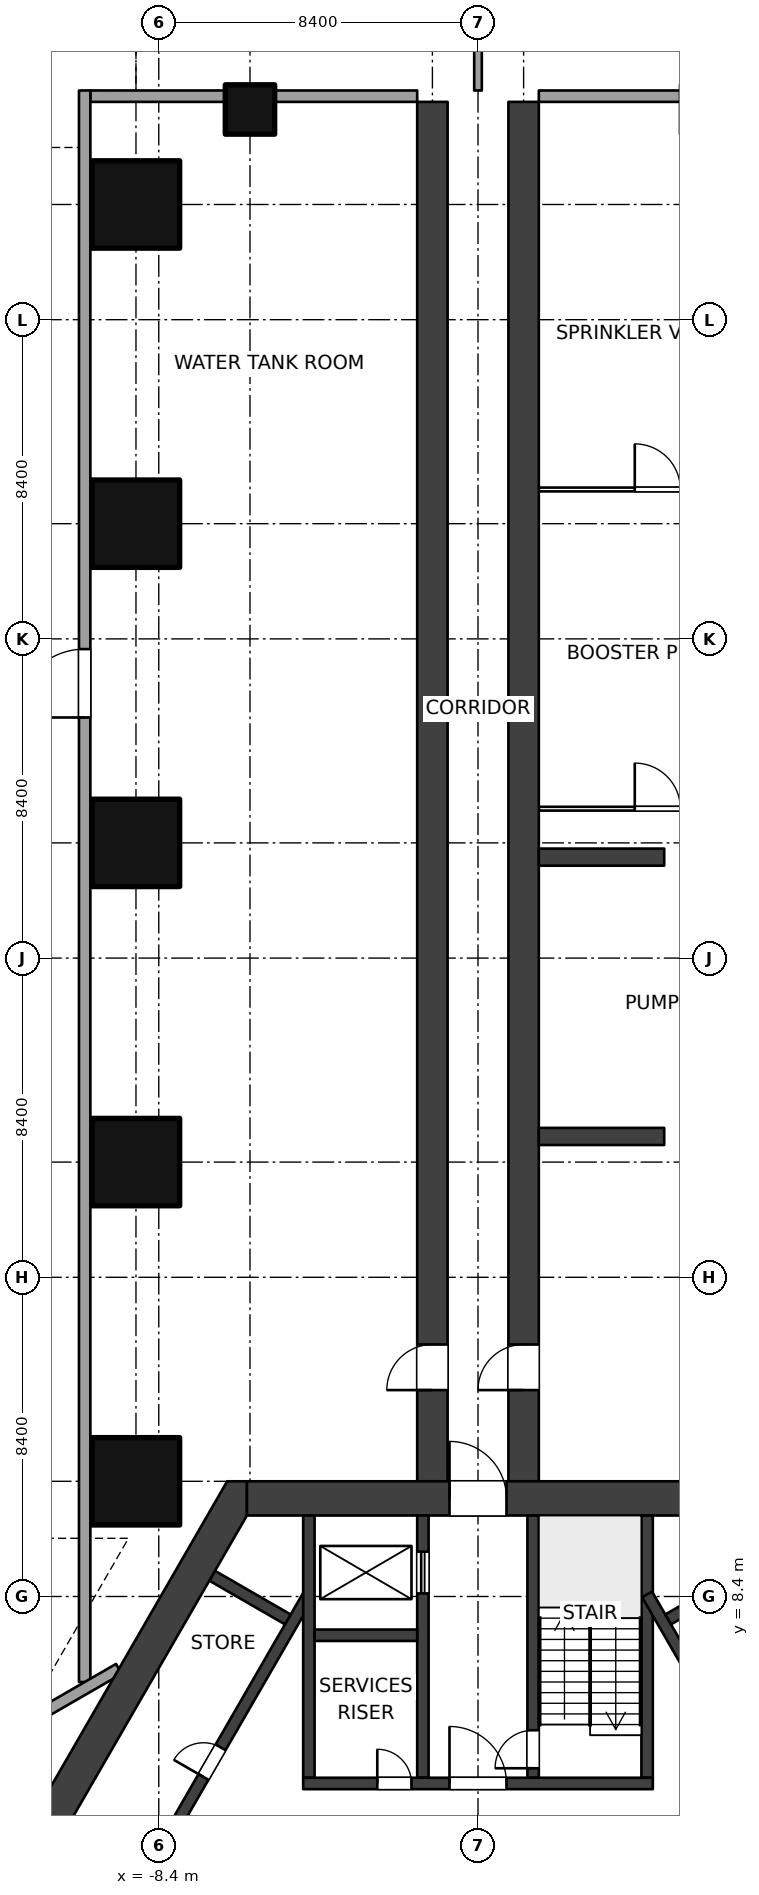
"""IFC4 building model, lengths in metres.
Left out: names, types, materials, properties, quantities, classifications, styles, units other than length and angle.
Written with IfcOpenShell. Run it as: python <this file> out.ifc"""

import sys

from ifc_helpers import new_model, si_unit, direction, frame, frame_2d, origin, origin_2d, place, context, subcontext, project, spatial, polyline, rectangle, outline, extrude, element, fill, save


model = new_model("IFC4")
c1 = context("Model", 3, precision=1e-05, world=origin(), true_north=direction((0.0, 1.0)))
c2 = subcontext(c1, "Body", "Model", "MODEL_VIEW")
j1 = project(units=[si_unit("LENGTHUNIT", "METRE"), si_unit("PLANEANGLEUNIT", "RADIAN")], contexts=[c1])
p1 = place(None, origin())
s1 = spatial("IfcSite", under=j1, at=p1, CompositionType="ELEMENT")
p2 = place(p1, origin())
s2 = spatial("IfcBuilding", under=s1, at=p2, CompositionType="ELEMENT")
p3 = place(p2, frame((0.0, 0.0, -10.5)))
s3 = spatial("IfcBuildingStorey", under=s2, at=p3, CompositionType="ELEMENT", Elevation=-10.5)
for number, where, z_axis, x_axis in (
    (1, (-9.0, 11.432, 0.0), (0.0, 0.0, 1.0), (1.0, 0.0, 0.0)),
    (2, (-9.0, 19.832, 0.0), (0.0, 0.0, 1.0), (1.0, 0.0, 0.0)),
    (3, (-9.0, 28.231, 0.0), (0.0, 0.0, 1.0), (1.0, 0.0, 0.0)),
    (4, (-9.0, 36.632, 0.0), (0.0, 0.0, 1.0), (1.0, 0.0, 0.0)),
    (5, (-9.0, 45.031, 0.0), (0.0, 0.0, 1.0), (1.0, 0.0, 0.0)),
):
    element("IfcColumn", number, at=place(p3, frame(where, z_axis=z_axis, x_axis=x_axis)), inside=s3, PredefinedType="COLUMN", context=c2, shape_type="SweptSolid", body=[
        extrude(rectangle(XDim=2.3, YDim=2.3, at=origin_2d()), origin(), (0.0, 0.0, 1.0), 3.5),
    ])
p4 = place(p3, frame((-6.0, 47.531, 0.0), z_axis=(0.0, 0.0, 1.0), x_axis=(1.0, 0.0, 0.0)))
e6 = element("IfcColumn", 6, at=p4, inside=s3, PredefinedType="COLUMN", context=c2, shape_type="SweptSolid", body=[
    extrude(rectangle(XDim=1.3, YDim=1.3, at=origin_2d()), origin(), (0.0, 0.0, 1.0), 3.5),
])
p5 = place(p3, frame((-6.08, 10.981, 0.0), z_axis=(0.0, 0.0, 1.0), x_axis=(1.0, 0.0, 0.0)))
e7 = element("IfcWall", 7, at=p5, inside=s3, PredefinedType="SHEAR", context=c2, shape_type="SweptSolid", body=[
    extrude(rectangle(XDim=12.161, YDim=0.9, at=frame_2d((6.08, 0.0))), origin(), (0.0, 0.0, 1.0), 3.5),
])
p6 = place(p5, frame((5.33, 0.0, 0.0)))
e8 = element("IfcOpeningElement", 8, at=p6, cuts=e7, PredefinedType="OPENING", context=c2, shape_type="SweptSolid", body=[
    extrude(rectangle(XDim=1.5, YDim=2.1, at=frame_2d((0.75, 1.05))), frame((0.0, 0.46, 0.0), z_axis=(0.0, -1.0, 0.0), x_axis=(1.0, 0.0, 0.0)), (0.0, 0.0, 1.0), 0.92),
])
p7 = place(p3, origin())
e9 = element("IfcWall", 9, at=p7, inside=s3, PredefinedType="SHEAR", context=c2, shape_type="SweptSolid", body=[
    extrude(outline(polyline([(-6.6, 11.432), (-13.2, 0.0), (-12.94, -0.45), (-12.161, 0.0), (-6.08, 10.531), (-6.08, 11.432), (-6.6, 11.432)])), origin(), (0.0, 0.0, 1.0), 3.5),
])
p8 = place(p3, frame((-4.6, 3.48, 0.0), z_axis=(0.0, 0.0, 1.0), x_axis=(1.0, 0.0, 0.0)))
e10 = element("IfcWall", 10, at=p8, inside=s3, PredefinedType="SHEAR", context=c2, shape_type="SweptSolid", body=[
    extrude(rectangle(XDim=9.2, YDim=0.3, at=frame_2d((4.6, 0.0))), origin(), (0.0, 0.0, 1.0), 3.5),
])
p9 = place(p8, frame((3.85, 0.0, 0.0)))
e11 = element("IfcOpeningElement", 11, at=p9, cuts=e10, PredefinedType="OPENING", context=c2, shape_type="SweptSolid", body=[
    extrude(rectangle(XDim=1.5, YDim=2.1, at=frame_2d((0.75, 1.05))), frame((0.0, 0.16, 0.0), z_axis=(0.0, -1.0, 0.0), x_axis=(1.0, 0.0, 0.0)), (0.0, 0.0, 1.0), 0.32),
])
p10 = place(p8, frame((1.95, 0.0, 0.0)))
e12 = element("IfcOpeningElement", 12, at=p10, cuts=e10, PredefinedType="OPENING", context=c2, shape_type="SweptSolid", body=[
    extrude(rectangle(XDim=0.9, YDim=2.1, at=frame_2d((0.45, 1.05))), frame((0.0, 0.16, 0.0), z_axis=(0.0, -1.0, 0.0), x_axis=(1.0, 0.0, 0.0)), (0.0, 0.0, 1.0), 0.32),
])
p11 = place(p3, frame((1.45, 3.63, 0.0), z_axis=(0.0, 0.0, 1.0), x_axis=(0.0, 1.0, 0.0)))
e13 = element("IfcWall", 13, at=p11, inside=s3, PredefinedType="SHEAR", context=c2, shape_type="SweptSolid", body=[
    extrude(rectangle(XDim=6.902, YDim=0.3, at=frame_2d((3.451, 0.0))), origin(), (0.0, 0.0, 1.0), 3.5),
])
p12 = place(p11, frame((0.25, 0.0, 0.0)))
e14 = element("IfcOpeningElement", 14, at=p12, cuts=e13, PredefinedType="OPENING", context=c2, shape_type="SweptSolid", body=[
    extrude(rectangle(XDim=1.0, YDim=2.1, at=frame_2d((0.5, 1.05))), frame((0.0, 0.16, 0.0), z_axis=(0.0, -1.0, 0.0), x_axis=(1.0, 0.0, 0.0)), (0.0, 0.0, 1.0), 0.32),
])
p13 = place(p3, frame((4.45, 3.63, 0.0), z_axis=(0.0, 0.0, 1.0), x_axis=(0.0, 1.0, 0.0)))
e15 = element("IfcWall", 15, at=p13, inside=s3, PredefinedType="SHEAR", context=c2, shape_type="SweptSolid", body=[
    extrude(rectangle(XDim=6.902, YDim=0.3, at=frame_2d((3.451, 0.0))), origin(), (0.0, 0.0, 1.0), 3.5),
])
p14 = place(p3, frame((-1.45, 3.63, 0.0), z_axis=(0.0, 0.0, 1.0), x_axis=(0.0, 1.0, 0.0)))
e16 = element("IfcWall", 16, at=p14, inside=s3, PredefinedType="SHEAR", context=c2, shape_type="SweptSolid", body=[
    extrude(rectangle(XDim=6.902, YDim=0.3, at=frame_2d((3.451, 0.0))), origin(), (0.0, 0.0, 1.0), 3.5),
])
p15 = place(p14, frame((4.85, 0.0, 0.0)))
e17 = element("IfcOpeningElement", 17, at=p15, cuts=e16, PredefinedType="OPENING", context=c2, shape_type="SweptSolid", body=[
    extrude(rectangle(XDim=1.1, YDim=2.1, at=frame_2d((0.55, 1.05))), frame((0.0, 0.16, 0.0), z_axis=(0.0, -1.0, 0.0), x_axis=(1.0, 0.0, 0.0)), (0.0, 0.0, 1.0), 0.32),
])
p16 = place(p3, frame((-4.45, 3.63, 0.0), z_axis=(0.0, 0.0, 1.0), x_axis=(0.0, 1.0, 0.0)))
e18 = element("IfcWall", 18, at=p16, inside=s3, PredefinedType="SHEAR", context=c2, shape_type="SweptSolid", body=[
    extrude(rectangle(XDim=6.902, YDim=0.3, at=frame_2d((3.451, 0.0))), origin(), (0.0, 0.0, 1.0), 3.5),
])
p17 = place(p3, frame((-4.3, 7.38, 0.0), z_axis=(0.0, 0.0, 1.0), x_axis=(1.0, 0.0, 0.0)))
e19 = element("IfcWall", 19, at=p17, inside=s3, PredefinedType="SHEAR", context=c2, shape_type="SweptSolid", body=[
    extrude(rectangle(XDim=2.7, YDim=0.3, at=frame_2d((1.35, 0.0))), origin(), (0.0, 0.0, 1.0), 3.5),
])
p18 = place(p3, frame((4.45, 8.455, 0.0), z_axis=(0.0, 0.0, 1.0), x_axis=(0.500002290144, -0.866024081565, 0.0)))
e20 = element("IfcWall", 20, at=p18, inside=s3, PredefinedType="SHEAR", context=c2, shape_type="SweptSolid", body=[
    extrude(rectangle(XDim=10.195, YDim=0.3, at=frame_2d((5.098, 0.0))), origin(), (0.0, 0.0, 1.0), 3.5),
])
p19 = place(p18, frame((4.648, 0.0, 0.0)))
e21 = element("IfcOpeningElement", 21, at=p19, cuts=e20, PredefinedType="OPENING", context=c2, shape_type="SweptSolid", body=[
    extrude(rectangle(XDim=0.9, YDim=2.1, at=frame_2d((0.45, 1.05))), frame((0.0, 0.16, 0.0), z_axis=(0.0, -1.0, 0.0), x_axis=(1.0, 0.0, 0.0)), (0.0, 0.0, 1.0), 0.32),
])
p20 = place(p3, frame((5.004, 7.796, 0.0), z_axis=(0.0, 0.0, 1.0), x_axis=(0.866053019151, 0.499952165731, 0.0)))
e22 = element("IfcWall", 22, at=p20, inside=s3, PredefinedType="SHEAR", context=c2, shape_type="SweptSolid", body=[
    extrude(rectangle(XDim=2.3, YDim=0.3, at=frame_2d((1.15, 0.0))), origin(), (0.0, 0.0, 1.0), 3.5),
])
p21 = place(p3, frame((-9.548, -0.374, 0.0), z_axis=(0.0, 0.0, 1.0), x_axis=(0.500002290144, 0.866024081565, 0.0)))
e23 = element("IfcWall", 23, at=p21, inside=s3, PredefinedType="SHEAR", context=c2, shape_type="SweptSolid", body=[
    extrude(rectangle(XDim=10.195, YDim=0.3, at=frame_2d((5.098, 0.0))), origin(), (0.0, 0.0, 1.0), 3.5),
])
p22 = place(p21, frame((4.648, 0.0, 0.0)))
e24 = element("IfcOpeningElement", 24, at=p22, cuts=e23, PredefinedType="OPENING", context=c2, shape_type="SweptSolid", body=[
    extrude(rectangle(XDim=0.9, YDim=2.1, at=frame_2d((0.45, 1.05))), frame((0.0, 0.16, 0.0), z_axis=(0.0, -1.0, 0.0), x_axis=(1.0, 0.0, 0.0)), (0.0, 0.0, 1.0), 0.32),
])
p23 = place(p3, frame((-5.004, 7.796, 0.0), z_axis=(0.0, 0.0, 1.0), x_axis=(-0.866053019151, 0.499952165731, 0.0)))
e25 = element("IfcWall", 25, at=p23, inside=s3, PredefinedType="SHEAR", context=c2, shape_type="SweptSolid", body=[
    extrude(rectangle(XDim=2.3, YDim=0.3, at=frame_2d((1.15, 0.0))), origin(), (0.0, 0.0, 1.0), 3.5),
])
p24 = place(p3, frame((-1.2, 10.981, 0.0), z_axis=(0.0, 0.0, 1.0), x_axis=(0.0, 1.0, 0.0)))
e26 = element("IfcWall", 26, at=p24, inside=s3, PredefinedType="SHEAR", context=c2, shape_type="SweptSolid", body=[
    extrude(rectangle(XDim=36.75, YDim=0.8, at=frame_2d((18.375, 0.0))), origin(), (0.0, 0.0, 1.0), 3.5),
])
p25 = place(p24, frame((2.85, 0.0, 0.0)))
e27 = element("IfcOpeningElement", 27, at=p25, cuts=e26, PredefinedType="OPENING", context=c2, shape_type="SweptSolid", body=[
    extrude(rectangle(XDim=1.2, YDim=2.1, at=frame_2d((0.6, 1.05))), frame((0.0, 0.41, 0.0), z_axis=(0.0, -1.0, 0.0), x_axis=(1.0, 0.0, 0.0)), (0.0, 0.0, 1.0), 0.82),
])
p26 = place(p3, frame((1.2, 10.981, 0.0), z_axis=(0.0, 0.0, 1.0), x_axis=(0.0, 1.0, 0.0)))
e28 = element("IfcWall", 28, at=p26, inside=s3, PredefinedType="SHEAR", context=c2, shape_type="SweptSolid", body=[
    extrude(rectangle(XDim=36.75, YDim=0.8, at=frame_2d((18.375, 0.0))), origin(), (0.0, 0.0, 1.0), 3.5),
])
p27 = place(p26, frame((2.85, 0.0, 0.0)))
e29 = element("IfcOpeningElement", 29, at=p27, cuts=e28, PredefinedType="OPENING", context=c2, shape_type="SweptSolid", body=[
    extrude(rectangle(XDim=1.2, YDim=2.1, at=frame_2d((0.6, 1.05))), frame((0.0, 0.41, 0.0), z_axis=(0.0, -1.0, 0.0), x_axis=(1.0, 0.0, 0.0)), (0.0, 0.0, 1.0), 0.82),
])
p28 = place(p3, frame((1.6, 29.132, 0.0), z_axis=(0.0, 0.0, 1.0), x_axis=(1.0, 0.0, 0.0)))
e30 = element("IfcWall", 30, at=p28, inside=s3, PredefinedType="PARTITIONING", context=c2, shape_type="SweptSolid", body=[
    extrude(rectangle(XDim=8.6, YDim=0.1, at=frame_2d((4.3, 0.0))), origin(), (0.0, 0.0, 1.0), 3.2),
])
p29 = place(p28, frame((2.525, 0.0, 0.0)))
e31 = element("IfcOpeningElement", 31, at=p29, cuts=e30, PredefinedType="OPENING", context=c2, shape_type="SweptSolid", body=[
    extrude(rectangle(XDim=1.2, YDim=2.1, at=frame_2d((0.6, 1.05))), frame((0.0, 0.06, 0.0), z_axis=(0.0, -1.0, 0.0), x_axis=(1.0, 0.0, 0.0)), (0.0, 0.0, 1.0), 0.12),
])
p30 = place(p3, frame((1.6, 37.531, 0.0), z_axis=(0.0, 0.0, 1.0), x_axis=(1.0, 0.0, 0.0)))
e32 = element("IfcWall", 32, at=p30, inside=s3, PredefinedType="PARTITIONING", context=c2, shape_type="SweptSolid", body=[
    extrude(rectangle(XDim=8.6, YDim=0.1, at=frame_2d((4.3, 0.0))), origin(), (0.0, 0.0, 1.0), 3.2),
])
p31 = place(p30, frame((2.525, 0.0, 0.0)))
e33 = element("IfcOpeningElement", 33, at=p31, cuts=e32, PredefinedType="OPENING", context=c2, shape_type="SweptSolid", body=[
    extrude(rectangle(XDim=1.2, YDim=2.1, at=frame_2d((0.6, 1.05))), frame((0.0, 0.06, 0.0), z_axis=(0.0, -1.0, 0.0), x_axis=(1.0, 0.0, 0.0)), (0.0, 0.0, 1.0), 0.12),
])
p32 = place(p3, frame((0.0, 48.031, 0.0), z_axis=(0.0, 0.0, 1.0), x_axis=(0.0, 1.0, 0.0)))
e34 = element("IfcWall", 34, at=p32, inside=s3, PredefinedType="SOLIDWALL", context=c2, shape_type="SweptSolid", body=[
    extrude(rectangle(XDim=2.769, YDim=0.2, at=frame_2d((1.384, 0.0))), origin(), (0.0, 0.0, 1.0), 3.2),
])
for number, where, z_axis, x_axis in (
    (35, (-1.6, 47.882, 0.0), (0.0, 0.0, 1.0), (-1.0, 0.0, 0.0)),
    (36, (1.6, 47.882, 0.0), (0.0, 0.0, 1.0), (1.0, 0.0, 0.0)),
):
    element("IfcWall", number, at=place(p3, frame(where, z_axis=z_axis, x_axis=x_axis)), inside=s3, PredefinedType="SOLIDWALL", context=c2, shape_type="SweptSolid", body=[
        extrude(rectangle(XDim=8.6, YDim=0.3, at=frame_2d((4.3, 0.0))), origin(), (0.0, 0.0, 1.0), 1.9),
    ])
p33 = place(p3, frame((-10.35, 6.149, 0.0), z_axis=(0.0, 0.0, 1.0), x_axis=(0.0, 1.0, 0.0)))
e37 = element("IfcWall", 37, at=p33, inside=s3, PredefinedType="SOLIDWALL", context=c2, shape_type="SweptSolid", body=[
    extrude(rectangle(XDim=41.883, YDim=0.3, at=frame_2d((20.941, 0.0))), origin(), (0.0, 0.0, 1.0), 3.2),
])
p34 = place(p33, frame((25.383, 0.0, 0.0)))
e38 = element("IfcOpeningElement", 38, at=p34, cuts=e37, PredefinedType="OPENING", context=c2, shape_type="SweptSolid", body=[
    extrude(rectangle(XDim=1.8, YDim=2.4, at=frame_2d((0.9, 1.2))), frame((0.0, 0.16, 0.0), z_axis=(0.0, -1.0, 0.0), x_axis=(1.0, 0.0, 0.0)), (0.0, 0.0, 1.0), 0.32),
])
p35 = place(p3, frame((-9.45, 6.495, 0.0), z_axis=(0.0, 0.0, 1.0), x_axis=(-0.866025301493, -0.500000177174, 0.0)))
e39 = element("IfcWall", 39, at=p35, inside=s3, PredefinedType="SOLIDWALL", context=c2, shape_type="SweptSolid", body=[
    extrude(rectangle(XDim=43.095, YDim=0.3, at=frame_2d((21.548, 0.0))), origin(), (0.0, 0.0, 1.0), 3.2),
])
p36 = place(p35, frame((26.595, 0.0, 0.0)))
e40 = element("IfcOpeningElement", 40, at=p36, cuts=e39, PredefinedType="OPENING", context=c2, shape_type="SweptSolid", body=[
    extrude(rectangle(XDim=1.8, YDim=2.4, at=frame_2d((0.9, 1.2))), frame((0.0, 0.16, 0.0), z_axis=(0.0, -1.0, 0.0), x_axis=(1.0, 0.0, 0.0)), (0.0, 0.0, 1.0), 0.32),
])
for number, where, z_axis, x_axis in (
    (41, (1.6, 20.507, 0.0), (0.0, 0.0, 1.0), (1.0, 0.0, 0.0)),
    (42, (1.6, 27.856, 0.0), (0.0, 0.0, 1.0), (1.0, 0.0, 0.0)),
):
    element("IfcWall", number, at=place(p3, frame(where, z_axis=z_axis, x_axis=x_axis)), inside=s3, PredefinedType="SOLIDWALL", context=c2, shape_type="SweptSolid", body=[
        extrude(rectangle(XDim=3.3, YDim=0.45, at=frame_2d((1.65, 0.0))), origin(), (0.0, 0.0, 1.0), 3.5),
    ])
p37 = place(p15, origin())
e43 = element("IfcDoor", 43, at=p37, inside=s3, OperationType="DOUBLE_DOOR_SLIDING", PredefinedType="DOOR", context=c2, shape_type="SweptSolid", body=[
    extrude(rectangle(XDim=1.1, YDim=2.1, at=frame_2d((0.55, 1.05))), frame((0.0, 0.025, 0.0), z_axis=(0.0, -1.0, 0.0), x_axis=(1.0, 0.0, 0.0)), (0.0, 0.0, 1.0), 0.05),
])
fill(e17, e43)
p38 = place(p9, origin())
e44 = element("IfcDoor", 44, at=p38, inside=s3, OperationType="DOUBLE_DOOR_DOUBLE_SWING", PredefinedType="DOOR", context=c2, shape_type="SweptSolid", body=[
    extrude(rectangle(XDim=1.5, YDim=2.1, at=frame_2d((0.75, 1.05))), frame((0.0, 0.025, 0.0), z_axis=(0.0, -1.0, 0.0), x_axis=(1.0, 0.0, 0.0)), (0.0, 0.0, 1.0), 0.05),
])
fill(e11, e44)
p39 = place(p10, origin())
e45 = element("IfcDoor", 45, at=p39, inside=s3, OperationType="SINGLE_SWING_LEFT", PredefinedType="DOOR", context=c2, shape_type="SweptSolid", body=[
    extrude(rectangle(XDim=0.9, YDim=2.1, at=frame_2d((0.45, 1.05))), frame((0.0, 0.025, 0.0), z_axis=(0.0, -1.0, 0.0), x_axis=(1.0, 0.0, 0.0)), (0.0, 0.0, 1.0), 0.05),
])
fill(e12, e45)
p40 = place(p12, origin())
e46 = element("IfcDoor", 46, at=p40, inside=s3, OperationType="SINGLE_SWING_LEFT", PredefinedType="DOOR", context=c2, shape_type="SweptSolid", body=[
    extrude(rectangle(XDim=1.0, YDim=2.1, at=frame_2d((0.5, 1.05))), frame((0.0, 0.025, 0.0), z_axis=(0.0, -1.0, 0.0), x_axis=(1.0, 0.0, 0.0)), (0.0, 0.0, 1.0), 0.05),
])
fill(e14, e46)
p41 = place(p6, origin())
e47 = element("IfcDoor", 47, at=p41, inside=s3, OperationType="DOUBLE_DOOR_DOUBLE_SWING", PredefinedType="DOOR", context=c2, shape_type="SweptSolid", body=[
    extrude(rectangle(XDim=1.5, YDim=2.1, at=frame_2d((0.75, 1.05))), frame((0.0, 0.025, 0.0), z_axis=(0.0, -1.0, 0.0), x_axis=(1.0, 0.0, 0.0)), (0.0, 0.0, 1.0), 0.05),
])
fill(e8, e47)
p42 = place(p22, origin())
e48 = element("IfcDoor", 48, at=p42, inside=s3, OperationType="SINGLE_SWING_LEFT", PredefinedType="DOOR", context=c2, shape_type="SweptSolid", body=[
    extrude(rectangle(XDim=0.9, YDim=2.1, at=frame_2d((0.45, 1.05))), frame((0.0, 0.025, 0.0), z_axis=(0.0, -1.0, 0.0), x_axis=(1.0, 0.0, 0.0)), (0.0, 0.0, 1.0), 0.05),
])
fill(e24, e48)
p43 = place(p25, origin())
e49 = element("IfcDoor", 49, at=p43, inside=s3, OperationType="DOUBLE_SWING_LEFT", PredefinedType="DOOR", context=c2, shape_type="SweptSolid", body=[
    extrude(rectangle(XDim=1.2, YDim=2.1, at=frame_2d((0.6, 1.05))), frame((0.0, 0.025, 0.0), z_axis=(0.0, -1.0, 0.0), x_axis=(1.0, 0.0, 0.0)), (0.0, 0.0, 1.0), 0.05),
])
fill(e27, e49)
p44 = place(p29, origin())
e50 = element("IfcDoor", 50, at=p44, inside=s3, OperationType="DOUBLE_SWING_LEFT", PredefinedType="DOOR", context=c2, shape_type="SweptSolid", body=[
    extrude(rectangle(XDim=1.2, YDim=2.1, at=frame_2d((0.6, 1.05))), frame((0.0, 0.025, 0.0), z_axis=(0.0, -1.0, 0.0), x_axis=(1.0, 0.0, 0.0)), (0.0, 0.0, 1.0), 0.05),
])
fill(e31, e50)
p45 = place(p31, origin())
e51 = element("IfcDoor", 51, at=p45, inside=s3, OperationType="DOUBLE_SWING_LEFT", PredefinedType="DOOR", context=c2, shape_type="SweptSolid", body=[
    extrude(rectangle(XDim=1.2, YDim=2.1, at=frame_2d((0.6, 1.05))), frame((0.0, 0.025, 0.0), z_axis=(0.0, -1.0, 0.0), x_axis=(1.0, 0.0, 0.0)), (0.0, 0.0, 1.0), 0.05),
])
fill(e33, e51)
p46 = place(p27, origin())
e52 = element("IfcDoor", 52, at=p46, inside=s3, OperationType="DOUBLE_SWING_LEFT", PredefinedType="DOOR", context=c2, shape_type="SweptSolid", body=[
    extrude(rectangle(XDim=1.2, YDim=2.1, at=frame_2d((0.6, 1.05))), frame((0.0, 0.025, 0.0), z_axis=(0.0, -1.0, 0.0), x_axis=(1.0, 0.0, 0.0)), (0.0, 0.0, 1.0), 0.05),
])
fill(e29, e52)
p47 = place(p34, origin())
e53 = element("IfcDoor", 53, at=p47, inside=s3, OperationType="DOUBLE_DOOR_DOUBLE_SWING", PredefinedType="DOOR", context=c2, shape_type="SweptSolid", body=[
    extrude(rectangle(XDim=1.8, YDim=2.4, at=frame_2d((0.9, 1.2))), frame((0.0, 0.025, 0.0), z_axis=(0.0, -1.0, 0.0), x_axis=(1.0, 0.0, 0.0)), (0.0, 0.0, 1.0), 0.05),
])
fill(e38, e53)
save(model, sys.argv[1])
